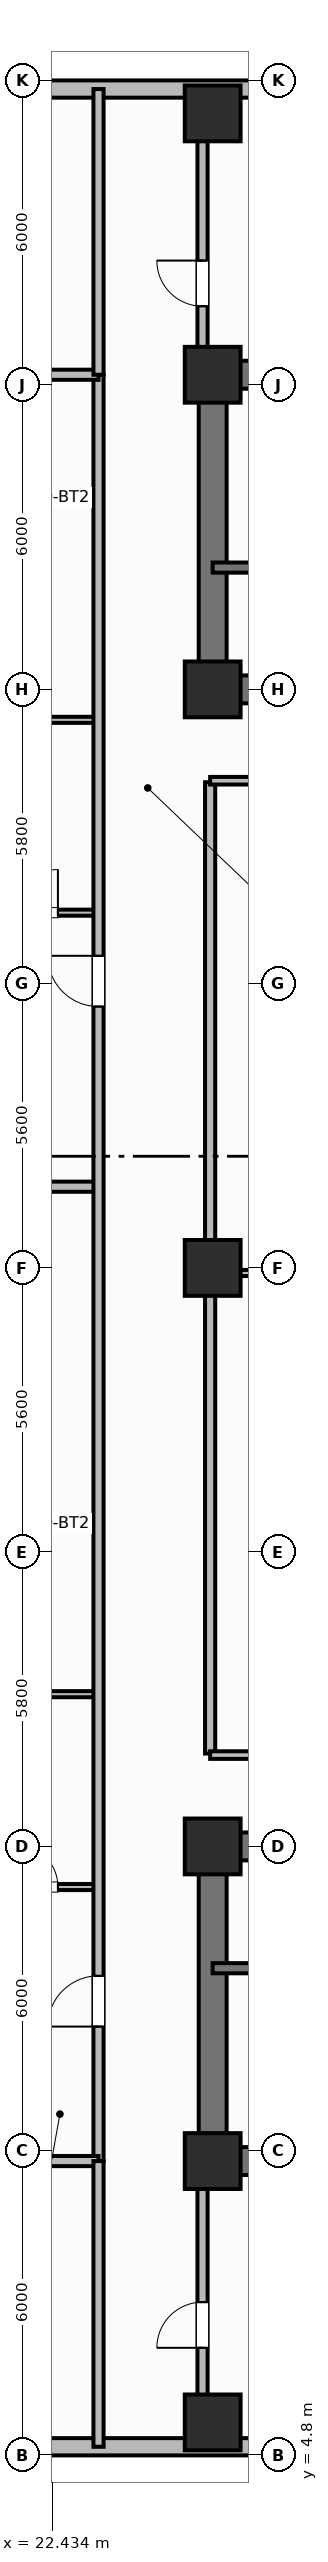
"""IFC4 building model, lengths in metres.
Left out: names, types, materials, properties, quantities, classifications, styles, units other than length and angle.
Written with IfcOpenShell. Run it as: python <this file> out.ifc"""

import sys

from ifc_helpers import new_model, si_unit, direction, frame, frame_2d, origin, origin_2d, place, context, subcontext, project, spatial, rectangle, extrude, element, fill, save


model = new_model("IFC4")
c1 = context("Model", 3, precision=1e-05, world=origin(), true_north=direction((0.0, 1.0)))
c2 = subcontext(c1, "Body", "Model", "MODEL_VIEW")
j1 = project(units=[si_unit("LENGTHUNIT", "METRE"), si_unit("PLANEANGLEUNIT", "RADIAN")], contexts=[c1])
p1 = place(None, origin())
s1 = spatial("IfcSite", under=j1, at=p1, CompositionType="ELEMENT")
p2 = place(p1, origin())
s2 = spatial("IfcBuilding", under=s1, at=p2, CompositionType="ELEMENT")
p3 = place(p2, frame((0.0, 0.0, 92.0)))
s3 = spatial("IfcBuildingStorey", under=s2, at=p3, CompositionType="ELEMENT", Elevation=92.0)
p4 = place(p3, frame((52.8, 10.6, 0.0), z_axis=(0.0, 0.0, 1.0), x_axis=(-1.0, 0.0, 0.0)))
e1 = element("IfcWall", 1, at=p4, inside=s3, PredefinedType="SHEAR", context=c2, shape_type="SweptSolid", body=[
    extrude(rectangle(XDim=27.2, YDim=0.55, at=frame_2d((13.6, 0.0))), origin(), (0.0, 0.0, 1.0), 3.7),
])
p5 = place(p3, frame((25.6, 10.875, 0.0), z_axis=(0.0, 0.0, 1.0), x_axis=(0.0, 1.0, 0.0)))
e2 = element("IfcWall", 2, at=p5, inside=s3, PredefinedType="SHEAR", context=c2, shape_type="SweptSolid", body=[
    extrude(rectangle(XDim=5.65, YDim=0.55, at=frame_2d((2.825, 0.0))), origin(), (0.0, 0.0, 1.0), 3.7),
])
p6 = place(p3, frame((25.6, 16.8, 0.0), z_axis=(0.0, 0.0, 1.0), x_axis=(1.0, 0.0, 0.0)))
e3 = element("IfcWall", 3, at=p6, inside=s3, PredefinedType="SHEAR", context=c2, shape_type="SweptSolid", body=[
    extrude(rectangle(XDim=27.2, YDim=0.55, at=frame_2d((13.6, 0.0))), origin(), (0.0, 0.0, 1.0), 3.7),
])
p7 = place(p6, frame((1.9, 0.0, 0.0)))
e4 = element("IfcOpeningElement", 4, at=p7, cuts=e3, PredefinedType="OPENING", context=c2, shape_type="SweptSolid", body=[
    extrude(rectangle(XDim=1.1, YDim=2.15, at=frame_2d((0.55, 1.075))), frame((0.0, 0.285, 0.0), z_axis=(0.0, -1.0, 0.0), x_axis=(1.0, 0.0, 0.0)), (0.0, 0.0, 1.0), 0.57),
])
p8 = place(p6, frame((13.0, 0.0, 0.0)))
e5 = element("IfcOpeningElement", 5, at=p8, cuts=e3, PredefinedType="OPENING", context=c2, shape_type="SweptSolid", body=[
    extrude(rectangle(XDim=1.2, YDim=2.15, at=frame_2d((0.6, 1.075))), frame((0.0, 0.285, 0.0), z_axis=(0.0, -1.0, 0.0), x_axis=(1.0, 0.0, 0.0)), (0.0, 0.0, 1.0), 0.57),
])
p9 = place(p6, frame((21.6, 0.0, 0.0)))
e6 = element("IfcOpeningElement", 6, at=p9, cuts=e3, PredefinedType="OPENING", context=c2, shape_type="SweptSolid", body=[
    extrude(rectangle(XDim=1.0, YDim=2.15, at=frame_2d((0.5, 1.075))), frame((0.0, 0.285, 0.0), z_axis=(0.0, -1.0, 0.0), x_axis=(1.0, 0.0, 0.0)), (0.0, 0.0, 1.0), 0.57),
])
p10 = place(p3, frame((25.6, 45.8, 0.0), z_axis=(0.0, 0.0, 1.0), x_axis=(1.0, 0.0, 0.0)))
e7 = element("IfcWall", 7, at=p10, inside=s3, PredefinedType="SHEAR", context=c2, shape_type="SweptSolid", body=[
    extrude(rectangle(XDim=27.2, YDim=0.55, at=frame_2d((13.6, 0.0))), origin(), (0.0, 0.0, 1.0), 3.7),
])
p11 = place(p3, frame((25.6, 39.875, 0.0), z_axis=(0.0, 0.0, 1.0), x_axis=(0.0, 1.0, 0.0)))
e8 = element("IfcWall", 8, at=p11, inside=s3, PredefinedType="SHEAR", context=c2, shape_type="SweptSolid", body=[
    extrude(rectangle(XDim=5.65, YDim=0.55, at=frame_2d((2.825, 0.0))), origin(), (0.0, 0.0, 1.0), 3.7),
])
p12 = place(p3, frame((52.8, 39.6, 0.0), z_axis=(0.0, 0.0, 1.0), x_axis=(-1.0, 0.0, 0.0)))
e9 = element("IfcWall", 9, at=p12, inside=s3, PredefinedType="SHEAR", context=c2, shape_type="SweptSolid", body=[
    extrude(rectangle(XDim=27.2, YDim=0.55, at=frame_2d((13.6, 0.0))), origin(), (0.0, 0.0, 1.0), 3.7),
])
p13 = place(p12, frame((24.2, 0.0, 0.0)))
e10 = element("IfcOpeningElement", 10, at=p13, cuts=e9, PredefinedType="OPENING", context=c2, shape_type="SweptSolid", body=[
    extrude(rectangle(XDim=1.1, YDim=2.15, at=frame_2d((0.55, 1.075))), frame((0.0, 0.285, 0.0), z_axis=(0.0, -1.0, 0.0), x_axis=(1.0, 0.0, 0.0)), (0.0, 0.0, 1.0), 0.57),
])
p14 = place(p12, frame((15.1, 0.0, 0.0)))
e11 = element("IfcOpeningElement", 11, at=p14, cuts=e9, PredefinedType="OPENING", context=c2, shape_type="SweptSolid", body=[
    extrude(rectangle(XDim=1.2, YDim=2.15, at=frame_2d((0.6, 1.075))), frame((0.0, 0.285, 0.0), z_axis=(0.0, -1.0, 0.0), x_axis=(1.0, 0.0, 0.0)), (0.0, 0.0, 1.0), 0.57),
])
p15 = place(p12, frame((11.3, 0.0, 0.0)))
e12 = element("IfcOpeningElement", 12, at=p15, cuts=e9, PredefinedType="OPENING", context=c2, shape_type="SweptSolid", body=[
    extrude(rectangle(XDim=1.3, YDim=2.2, at=frame_2d((0.65, 1.1))), frame((0.0, 0.285, 0.0), z_axis=(0.0, -1.0, 0.0), x_axis=(1.0, 0.0, 0.0)), (0.0, 0.0, 1.0), 0.57),
])
p16 = place(p12, frame((7.25, 0.0, 0.0)))
e13 = element("IfcOpeningElement", 13, at=p16, cuts=e9, PredefinedType="OPENING", context=c2, shape_type="SweptSolid", body=[
    extrude(rectangle(XDim=0.85, YDim=2.1, at=frame_2d((0.425, 1.05))), frame((0.0, 0.285, 0.0), z_axis=(0.0, -1.0, 0.0), x_axis=(1.0, 0.0, 0.0)), (0.0, 0.0, 1.0), 0.57),
])
p17 = place(p12, frame((3.0, 0.0, 0.0)))
e14 = element("IfcOpeningElement", 14, at=p17, cuts=e9, PredefinedType="OPENING", context=c2, shape_type="SweptSolid", body=[
    extrude(rectangle(XDim=0.9, YDim=2.1, at=frame_2d((0.45, 1.05))), frame((0.0, 0.285, 0.0), z_axis=(0.0, -1.0, 0.0), x_axis=(1.0, 0.0, 0.0)), (0.0, 0.0, 1.0), 0.57),
])
for number, where, z_axis, x_axis in (
    (15, (25.6, 10.6, 0.0), (0.0, 0.0, 1.0), (1.0, 0.0, 0.0)),
    (16, (25.6, 16.8, 0.0), (0.0, 0.0, 1.0), (1.0, 0.0, 0.0)),
    (17, (25.6, 39.6, 0.0), (0.0, 0.0, 1.0), (1.0, 0.0, 0.0)),
    (18, (25.6, 45.8, 0.0), (0.0, 0.0, 1.0), (1.0, 0.0, 0.0)),
    (19, (25.6, 28.2, 0.0), (0.0, 0.0, 1.0), (1.0, 0.0, 0.0)),
    (20, (25.6, 5.45, 0.0), (0.0, 0.0, 1.0), (1.0, 0.0, 0.0)),
    (21, (25.6, 50.95, 0.0), (0.0, 0.0, 1.0), (1.0, 0.0, 0.0)),
):
    element("IfcColumn", number, at=place(p3, frame(where, z_axis=z_axis, x_axis=x_axis)), inside=s3, PredefinedType="COLUMN", context=c2, shape_type="SweptSolid", body=[
        extrude(rectangle(XDim=1.1, YDim=1.1, at=origin_2d()), origin(), (0.0, 0.0, 1.0), 3.7),
    ])
p18 = place(p3, frame((18.6, 4.97, 0.0), z_axis=(0.0, 0.0, 1.0), x_axis=(1.0, 0.0, 0.0)))
e22 = element("IfcWall", 22, at=p18, inside=s3, PredefinedType="SOLIDWALL", context=c2, shape_type="SweptSolid", body=[
    extrude(rectangle(XDim=17.4, YDim=0.34, at=frame_2d((8.7, 0.0))), origin(), (0.0, 0.0, 1.0), 2.7),
])
p19 = place(p18, frame((1.56, 0.0, 0.73)))
e23 = element("IfcOpeningElement", 23, at=p19, cuts=e22, PredefinedType="OPENING", context=c2, shape_type="SweptSolid", body=[
    extrude(rectangle(XDim=1.4, YDim=1.85, at=frame_2d((0.7, 0.925))), frame((0.0, 0.18, 0.0), z_axis=(0.0, -1.0, 0.0), x_axis=(1.0, 0.0, 0.0)), (0.0, 0.0, 1.0), 0.36),
])
p20 = place(p18, frame((8.35, 0.0, 0.73)))
e24 = element("IfcOpeningElement", 24, at=p20, cuts=e22, PredefinedType="OPENING", context=c2, shape_type="SweptSolid", body=[
    extrude(rectangle(XDim=1.4, YDim=1.85, at=frame_2d((0.7, 0.925))), frame((0.0, 0.18, 0.0), z_axis=(0.0, -1.0, 0.0), x_axis=(1.0, 0.0, 0.0)), (0.0, 0.0, 1.0), 0.36),
])
p21 = place(p18, frame((13.74, 0.0, 0.73)))
e25 = element("IfcOpeningElement", 25, at=p21, cuts=e22, PredefinedType="OPENING", context=c2, shape_type="SweptSolid", body=[
    extrude(rectangle(XDim=1.4, YDim=1.85, at=frame_2d((0.7, 0.925))), frame((0.0, 0.18, 0.0), z_axis=(0.0, -1.0, 0.0), x_axis=(1.0, 0.0, 0.0)), (0.0, 0.0, 1.0), 0.36),
])
p22 = place(p3, frame((36.0, 51.43, 0.0), z_axis=(0.0, 0.0, 1.0), x_axis=(-1.0, 0.0, 0.0)))
e26 = element("IfcWall", 26, at=p22, inside=s3, PredefinedType="SOLIDWALL", context=c2, shape_type="SweptSolid", body=[
    extrude(rectangle(XDim=17.4, YDim=0.34, at=frame_2d((8.7, 0.0))), origin(), (0.0, 0.0, 1.0), 2.7),
])
p23 = place(p22, frame((2.113, 0.0, 0.73)))
e27 = element("IfcOpeningElement", 27, at=p23, cuts=e26, PredefinedType="OPENING", context=c2, shape_type="SweptSolid", body=[
    extrude(rectangle(XDim=1.8, YDim=1.85, at=frame_2d((0.9, 0.925))), frame((0.0, 0.18, 0.0), z_axis=(0.0, -1.0, 0.0), x_axis=(1.0, 0.0, 0.0)), (0.0, 0.0, 1.0), 0.36),
])
p24 = place(p22, frame((5.788, 0.0, 0.73)))
e28 = element("IfcOpeningElement", 28, at=p24, cuts=e26, PredefinedType="OPENING", context=c2, shape_type="SweptSolid", body=[
    extrude(rectangle(XDim=1.8, YDim=1.85, at=frame_2d((0.9, 0.925))), frame((0.0, 0.18, 0.0), z_axis=(0.0, -1.0, 0.0), x_axis=(1.0, 0.0, 0.0)), (0.0, 0.0, 1.0), 0.36),
])
p25 = place(p22, frame((13.837, 0.0, 0.73)))
e29 = element("IfcOpeningElement", 29, at=p25, cuts=e26, PredefinedType="OPENING", context=c2, shape_type="SweptSolid", body=[
    extrude(rectangle(XDim=1.8, YDim=1.85, at=frame_2d((0.9, 0.925))), frame((0.0, 0.18, 0.0), z_axis=(0.0, -1.0, 0.0), x_axis=(1.0, 0.0, 0.0)), (0.0, 0.0, 1.0), 0.36),
])
p26 = place(p3, frame((25.6, 14.4, 0.0), z_axis=(0.0, 0.0, 1.0), x_axis=(1.0, 0.0, 0.0)))
e30 = element("IfcWall", 30, at=p26, inside=s3, PredefinedType="SHEAR", context=c2, shape_type="SweptSolid", body=[
    extrude(rectangle(XDim=9.55, YDim=0.2, at=frame_2d((4.775, 0.0))), origin(), (0.0, 0.0, 1.0), 3.7),
])
p27 = place(p26, frame((1.05, 0.0, 0.0)))
e31 = element("IfcOpeningElement", 31, at=p27, cuts=e30, PredefinedType="OPENING", context=c2, shape_type="SweptSolid", body=[
    extrude(rectangle(XDim=1.1, YDim=2.15, at=frame_2d((0.55, 1.075))), frame((0.0, 0.11, 0.0), z_axis=(0.0, -1.0, 0.0), x_axis=(1.0, 0.0, 0.0)), (0.0, 0.0, 1.0), 0.22),
])
p28 = place(p3, frame((35.15, 42.0, 0.0), z_axis=(0.0, 0.0, 1.0), x_axis=(-1.0, 0.0, 0.0)))
e32 = element("IfcWall", 32, at=p28, inside=s3, PredefinedType="SHEAR", context=c2, shape_type="SweptSolid", body=[
    extrude(rectangle(XDim=9.55, YDim=0.2, at=frame_2d((4.775, 0.0))), origin(), (0.0, 0.0, 1.0), 3.7),
])
p29 = place(p28, frame((7.25, 0.0, 0.0)))
e33 = element("IfcOpeningElement", 33, at=p29, cuts=e32, PredefinedType="OPENING", context=c2, shape_type="SweptSolid", body=[
    extrude(rectangle(XDim=1.1, YDim=2.15, at=frame_2d((0.55, 1.075))), frame((0.0, 0.11, 0.0), z_axis=(0.0, -1.0, 0.0), x_axis=(1.0, 0.0, 0.0)), (0.0, 0.0, 1.0), 0.22),
])
p30 = place(p3, frame((25.55, 18.63, 0.0), z_axis=(0.0, 0.0, 1.0), x_axis=(0.0, 1.0, 0.0)))
e34 = element("IfcWall", 34, at=p30, inside=s3, PredefinedType="PARTITIONING", context=c2, shape_type="SweptSolid", body=[
    extrude(rectangle(XDim=19.14, YDim=0.2, at=frame_2d((9.57, 0.0))), origin(), (0.0, 0.0, 1.0), 2.53),
])
for number, where, z_axis, x_axis in (
    (35, (25.55, 18.6, 0.0), (0.0, 0.0, 1.0), (1.0, 0.0, 0.0)),
    (36, (25.55, 37.8, 0.0), (0.0, 0.0, 1.0), (1.0, 0.0, 0.0)),
):
    element("IfcWall", number, at=place(p3, frame(where, z_axis=z_axis, x_axis=x_axis)), inside=s3, PredefinedType="PARTITIONING", context=c2, shape_type="SweptSolid", body=[
        extrude(rectangle(XDim=6.5, YDim=0.15, at=frame_2d((3.25, 0.0))), origin(), (0.0, 0.0, 1.0), 2.53),
    ])
p31 = place(p3, frame((25.6, 28.1, 0.0), z_axis=(0.0, 0.0, 1.0), x_axis=(1.0, 0.0, 0.0)))
e37 = element("IfcWall", 37, at=p31, inside=s3, PredefinedType="PARTITIONING", context=c2, shape_type="SweptSolid", body=[
    extrude(rectangle(XDim=6.42, YDim=0.12, at=frame_2d((3.21, 0.0))), origin(), (0.0, 0.0, 1.0), 2.53),
])
p32 = place(p3, frame((21.1, 16.0, 0.0), z_axis=(0.0, 0.0, 1.0), x_axis=(1.0, 0.0, 0.0)))
e38 = element("IfcWall", 38, at=p32, inside=s3, PredefinedType="PARTITIONING", context=c2, shape_type="SweptSolid", body=[
    extrude(rectangle(XDim=2.25, YDim=0.12, at=frame_2d((1.125, 0.0))), origin(), (0.0, 0.0, 1.0), 2.53),
])
p33 = place(p32, frame((0.6, 0.0, 0.0)))
e39 = element("IfcOpeningElement", 39, at=p33, cuts=e38, PredefinedType="OPENING", context=c2, shape_type="SweptSolid", body=[
    extrude(rectangle(XDim=0.85, YDim=2.1, at=frame_2d((0.425, 1.05))), frame((0.0, 0.07, 0.0), z_axis=(0.0, -1.0, 0.0), x_axis=(1.0, 0.0, 0.0)), (0.0, 0.0, 1.0), 0.14),
])
p34 = place(p3, frame((21.1, 19.8, 0.0), z_axis=(0.0, 0.0, 1.0), x_axis=(1.0, 0.0, 0.0)))
e40 = element("IfcWall", 40, at=p34, inside=s3, PredefinedType="PARTITIONING", context=c2, shape_type="SweptSolid", body=[
    extrude(rectangle(XDim=2.25, YDim=0.12, at=frame_2d((1.125, 0.0))), origin(), (0.0, 0.0, 1.0), 2.53),
])
p35 = place(p3, frame((14.913, 29.8, 0.0), z_axis=(0.0, 0.0, 1.0), x_axis=(1.0, 0.0, 0.0)))
e41 = element("IfcWall", 41, at=p35, inside=s3, PredefinedType="PARTITIONING", context=c2, shape_type="SweptSolid", body=[
    extrude(rectangle(XDim=8.437, YDim=0.2, at=frame_2d((4.219, 0.0))), origin(), (0.0, 0.0, 1.0), 2.53),
])
p36 = place(p3, frame((21.1, 35.2, 0.0), z_axis=(0.0, 0.0, 1.0), x_axis=(1.0, 0.0, 0.0)))
e42 = element("IfcWall", 42, at=p36, inside=s3, PredefinedType="PARTITIONING", context=c2, shape_type="SweptSolid", body=[
    extrude(rectangle(XDim=2.25, YDim=0.12, at=frame_2d((1.125, 0.0))), origin(), (0.0, 0.0, 1.0), 2.53),
])
p37 = place(p36, frame((0.6, 0.0, 0.0)))
e43 = element("IfcOpeningElement", 43, at=p37, cuts=e42, PredefinedType="OPENING", context=c2, shape_type="SweptSolid", body=[
    extrude(rectangle(XDim=0.85, YDim=2.1, at=frame_2d((0.425, 1.05))), frame((0.0, 0.07, 0.0), z_axis=(0.0, -1.0, 0.0), x_axis=(1.0, 0.0, 0.0)), (0.0, 0.0, 1.0), 0.14),
])
p38 = place(p3, frame((21.1, 39.0, 0.0), z_axis=(0.0, 0.0, 1.0), x_axis=(1.0, 0.0, 0.0)))
e44 = element("IfcWall", 44, at=p38, inside=s3, PredefinedType="PARTITIONING", context=c2, shape_type="SweptSolid", body=[
    extrude(rectangle(XDim=2.25, YDim=0.12, at=frame_2d((1.125, 0.0))), origin(), (0.0, 0.0, 1.0), 2.53),
])
p39 = place(p3, frame((23.35, 10.6, 0.0), z_axis=(0.0, 0.0, 1.0), x_axis=(0.0, 1.0, 0.0)))
e45 = element("IfcWall", 45, at=p39, inside=s3, PredefinedType="PARTITIONING", context=c2, shape_type="SweptSolid", body=[
    extrude(rectangle(XDim=35.2, YDim=0.2, at=frame_2d((17.6, 0.0))), origin(), (0.0, 0.0, 1.0), 2.53),
])
p40 = place(p39, frame((2.65, 0.0, 0.0)))
e46 = element("IfcOpeningElement", 46, at=p40, cuts=e45, PredefinedType="OPENING", context=c2, shape_type="SweptSolid", body=[
    extrude(rectangle(XDim=1.0, YDim=2.15, at=frame_2d((0.5, 1.075))), frame((0.0, 0.11, 0.0), z_axis=(0.0, -1.0, 0.0), x_axis=(1.0, 0.0, 0.0)), (0.0, 0.0, 1.0), 0.22),
])
p41 = place(p39, frame((22.75, 0.0, 0.0)))
e47 = element("IfcOpeningElement", 47, at=p41, cuts=e45, PredefinedType="OPENING", context=c2, shape_type="SweptSolid", body=[
    extrude(rectangle(XDim=1.0, YDim=2.15, at=frame_2d((0.5, 1.075))), frame((0.0, 0.11, 0.0), z_axis=(0.0, -1.0, 0.0), x_axis=(1.0, 0.0, 0.0)), (0.0, 0.0, 1.0), 0.22),
])
for number, where, z_axis, x_axis in (
    (48, (14.99, 10.6, 0.0), (0.0, 0.0, 1.0), (1.0, 0.0, 0.0)),
    (49, (14.99, 45.8, 0.0), (0.0, 0.0, 1.0), (1.0, 0.0, 0.0)),
):
    element("IfcWall", number, at=place(p3, frame(where, z_axis=z_axis, x_axis=x_axis)), inside=s3, PredefinedType="PARTITIONING", context=c2, shape_type="SweptSolid", body=[
        extrude(rectangle(XDim=8.36, YDim=0.2, at=frame_2d((4.18, 0.0))), origin(), (0.0, 0.0, 1.0), 2.53),
    ])
p42 = place(p3, frame((23.35, 4.97, 0.0), z_axis=(0.0, 0.0, 1.0), x_axis=(0.0, 1.0, 0.0)))
e50 = element("IfcWall", 50, at=p42, inside=s3, PredefinedType="PARTITIONING", context=c2, shape_type="SweptSolid", body=[
    extrude(rectangle(XDim=5.63, YDim=0.2, at=frame_2d((2.815, 0.0))), origin(), (0.0, 0.0, 1.0), 2.53),
])
p43 = place(p3, frame((23.35, 45.8, 0.0), z_axis=(0.0, 0.0, 1.0), x_axis=(0.0, 1.0, 0.0)))
e51 = element("IfcWall", 51, at=p43, inside=s3, PredefinedType="PARTITIONING", context=c2, shape_type="SweptSolid", body=[
    extrude(rectangle(XDim=5.63, YDim=0.2, at=frame_2d((2.815, 0.0))), origin(), (0.0, 0.0, 1.0), 2.53),
])
p44 = place(p3, frame((25.4, 5.62, 0.0), z_axis=(0.0, 0.0, 1.0), x_axis=(0.0, 1.0, 0.0)))
e52 = element("IfcWall", 52, at=p44, inside=s3, PredefinedType="PARTITIONING", context=c2, shape_type="SweptSolid", body=[
    extrude(rectangle(XDim=4.68, YDim=0.2, at=frame_2d((2.34, 0.0))), origin(), (0.0, 0.0, 1.0), 2.53),
])
p45 = place(p44, frame((1.3, 0.0, 0.0)))
e53 = element("IfcOpeningElement", 53, at=p45, cuts=e52, PredefinedType="OPENING", context=c2, shape_type="SweptSolid", body=[
    extrude(rectangle(XDim=0.9, YDim=2.1, at=frame_2d((0.45, 1.05))), frame((0.0, 0.11, 0.0), z_axis=(0.0, -1.0, 0.0), x_axis=(1.0, 0.0, 0.0)), (0.0, 0.0, 1.0), 0.22),
])
p46 = place(p3, frame((25.4, 46.1, 0.0), z_axis=(0.0, 0.0, 1.0), x_axis=(0.0, 1.0, 0.0)))
e54 = element("IfcWall", 54, at=p46, inside=s3, PredefinedType="PARTITIONING", context=c2, shape_type="SweptSolid", body=[
    extrude(rectangle(XDim=4.68, YDim=0.2, at=frame_2d((2.34, 0.0))), origin(), (0.0, 0.0, 1.0), 2.53),
])
p47 = place(p46, frame((1.05, 0.0, 0.0)))
e55 = element("IfcOpeningElement", 55, at=p47, cuts=e54, PredefinedType="OPENING", context=c2, shape_type="SweptSolid", body=[
    extrude(rectangle(XDim=0.9, YDim=2.1, at=frame_2d((0.45, 1.05))), frame((0.0, 0.11, 0.0), z_axis=(0.0, -1.0, 0.0), x_axis=(1.0, 0.0, 0.0)), (0.0, 0.0, 1.0), 0.22),
])
p48 = place(p33, origin())
e56 = element("IfcDoor", 56, at=p48, inside=s3, OperationType="SINGLE_SWING_LEFT", PredefinedType="DOOR", context=c2, shape_type="SweptSolid", body=[
    extrude(rectangle(XDim=0.85, YDim=2.1, at=frame_2d((0.425, 1.05))), frame((0.0, 0.025, 0.0), z_axis=(0.0, -1.0, 0.0), x_axis=(1.0, 0.0, 0.0)), (0.0, 0.0, 1.0), 0.05),
])
fill(e39, e56)
p49 = place(p37, origin())
e57 = element("IfcDoor", 57, at=p49, inside=s3, OperationType="SINGLE_SWING_RIGHT", PredefinedType="DOOR", context=c2, shape_type="SweptSolid", body=[
    extrude(rectangle(XDim=0.85, YDim=2.1, at=frame_2d((0.425, 1.05))), frame((0.0, 0.025, 0.0), z_axis=(0.0, -1.0, 0.0), x_axis=(1.0, 0.0, 0.0)), (0.0, 0.0, 1.0), 0.05),
])
fill(e43, e57)
p50 = place(p40, origin())
e58 = element("IfcDoor", 58, at=p50, inside=s3, OperationType="SINGLE_SWING_LEFT", PredefinedType="DOOR", context=c2, shape_type="SweptSolid", body=[
    extrude(rectangle(XDim=1.0, YDim=2.15, at=frame_2d((0.5, 1.075))), frame((0.0, 0.025, 0.0), z_axis=(0.0, -1.0, 0.0), x_axis=(1.0, 0.0, 0.0)), (0.0, 0.0, 1.0), 0.05),
])
fill(e46, e58)
p51 = place(p41, origin())
e59 = element("IfcDoor", 59, at=p51, inside=s3, OperationType="SINGLE_SWING_RIGHT", PredefinedType="DOOR", context=c2, shape_type="SweptSolid", body=[
    extrude(rectangle(XDim=1.0, YDim=2.15, at=frame_2d((0.5, 1.075))), frame((0.0, 0.025, 0.0), z_axis=(0.0, -1.0, 0.0), x_axis=(1.0, 0.0, 0.0)), (0.0, 0.0, 1.0), 0.05),
])
fill(e47, e59)
p52 = place(p45, origin())
e60 = element("IfcDoor", 60, at=p52, inside=s3, OperationType="SINGLE_SWING_LEFT", PredefinedType="DOOR", context=c2, shape_type="SweptSolid", body=[
    extrude(rectangle(XDim=0.9, YDim=2.1, at=frame_2d((0.45, 1.05))), frame((0.0, 0.025, 0.0), z_axis=(0.0, -1.0, 0.0), x_axis=(1.0, 0.0, 0.0)), (0.0, 0.0, 1.0), 0.05),
])
fill(e53, e60)
p53 = place(p47, origin())
e61 = element("IfcDoor", 61, at=p53, inside=s3, OperationType="SINGLE_SWING_RIGHT", PredefinedType="DOOR", context=c2, shape_type="SweptSolid", body=[
    extrude(rectangle(XDim=0.9, YDim=2.1, at=frame_2d((0.45, 1.05))), frame((0.0, 0.025, 0.0), z_axis=(0.0, -1.0, 0.0), x_axis=(1.0, 0.0, 0.0)), (0.0, 0.0, 1.0), 0.05),
])
fill(e55, e61)
save(model, sys.argv[1])
